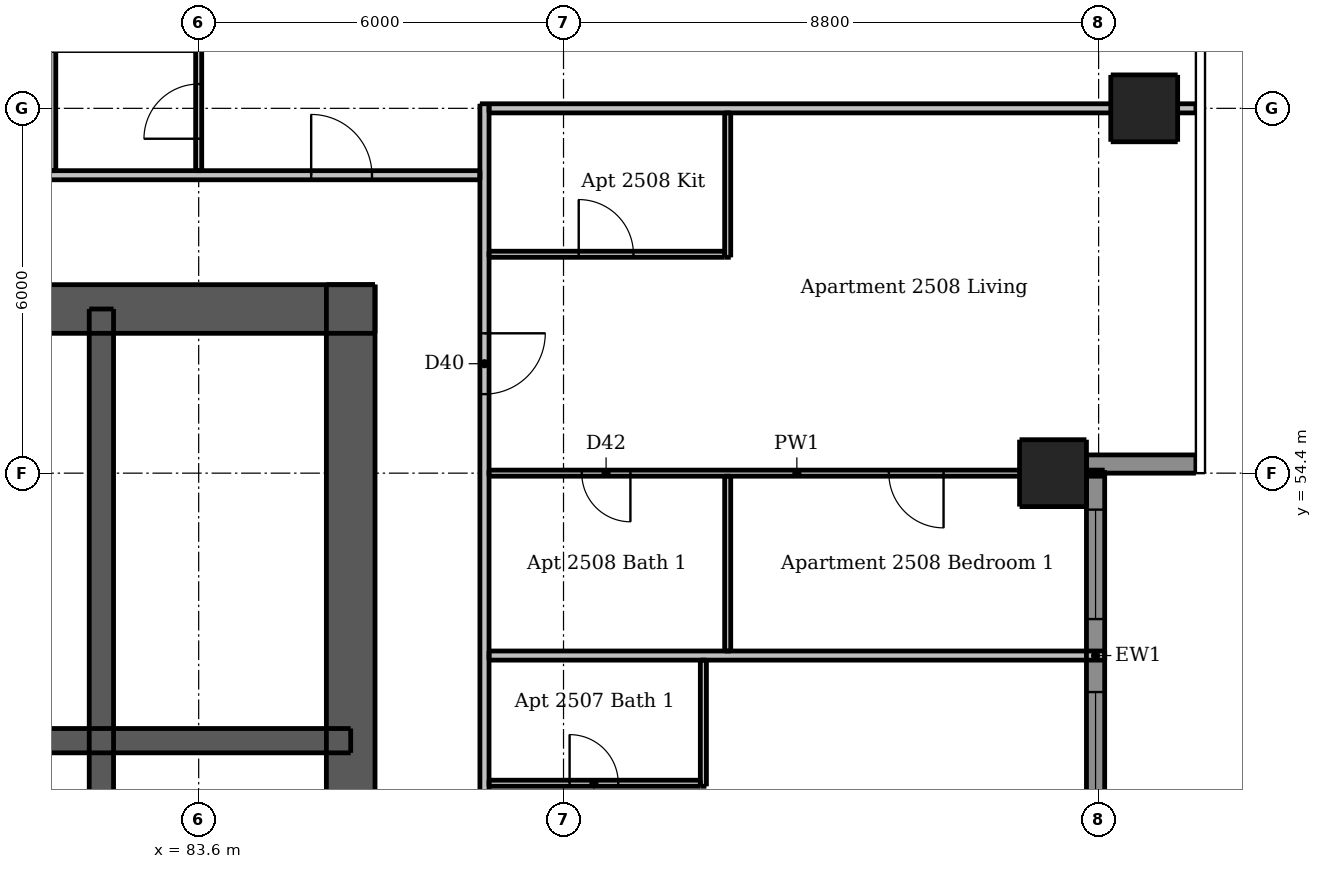
"""IFC4 building model, lengths in metres.
Left out: names, types, materials, properties, quantities, classifications, styles, units other than length and angle.
Written with IfcOpenShell. Run it as: python <this file> out.ifc"""

import sys

from ifc_helpers import new_model, si_unit, direction, frame, frame_2d, origin, origin_2d, place, context, subcontext, project, spatial, rectangle, extrude, element, fill, save


model = new_model("IFC4")
c1 = context("Model", 3, precision=1e-05, world=origin(), true_north=direction((0.0, 1.0)))
c2 = subcontext(c1, "Body", "Model", "MODEL_VIEW")
j1 = project(units=[si_unit("LENGTHUNIT", "METRE"), si_unit("PLANEANGLEUNIT", "RADIAN")], contexts=[c1])
p1 = place(None, origin())
s1 = spatial("IfcSite", under=j1, at=p1, CompositionType="ELEMENT")
p2 = place(p1, origin())
s2 = spatial("IfcBuilding", under=s1, at=p2, CompositionType="ELEMENT")
p3 = place(p2, frame((0.0, 0.0, 95.2)))
s3 = spatial("IfcBuildingStorey", under=s2, at=p3, CompositionType="ELEMENT", Elevation=95.2)
p4 = place(p3, frame((62.5, 57.1, 0.0), z_axis=(0.0, 0.0, 1.0), x_axis=(1.0, 0.0, 0.0)))
e1 = element("IfcWall", 1, at=p4, inside=s3, PredefinedType="SHEAR", context=c2, shape_type="SweptSolid", body=[
    extrude(rectangle(XDim=24.0, YDim=0.8, at=frame_2d((12.0, 0.0))), origin(), (0.0, 0.0, 1.0), 3.05),
])
p5 = place(p4, frame((20.9, 0.0, 0.0)))
e2 = element("IfcOpeningElement", 2, at=p5, cuts=e1, PredefinedType="OPENING", context=c2, shape_type="SweptSolid", body=[
    extrude(rectangle(XDim=1.1, YDim=2.1, at=frame_2d((0.55, 1.05))), frame((0.0, 0.41, 0.0), z_axis=(0.0, -1.0, 0.0), x_axis=(1.0, 0.0, 0.0)), (0.0, 0.0, 1.0), 0.82),
])
p6 = place(p4, frame((2.0, 0.0, 0.0)))
e3 = element("IfcOpeningElement", 3, at=p6, cuts=e1, PredefinedType="OPENING", context=c2, shape_type="SweptSolid", body=[
    extrude(rectangle(XDim=1.1, YDim=2.1, at=frame_2d((0.55, 1.05))), frame((0.0, 0.41, 0.0), z_axis=(0.0, -1.0, 0.0), x_axis=(1.0, 0.0, 0.0)), (0.0, 0.0, 1.0), 0.82),
])
p7 = place(p4, frame((11.55, 0.0, 0.0)))
e4 = element("IfcOpeningElement", 4, at=p7, cuts=e1, PredefinedType="OPENING", context=c2, shape_type="SweptSolid", body=[
    extrude(rectangle(XDim=0.9, YDim=2.1, at=frame_2d((0.45, 1.05))), frame((0.0, 0.41, 0.0), z_axis=(0.0, -1.0, 0.0), x_axis=(1.0, 0.0, 0.0)), (0.0, 0.0, 1.0), 0.82),
])
p8 = place(p3, frame((86.1, 33.5, 0.0), z_axis=(0.0, 0.0, 1.0), x_axis=(0.0, 1.0, 0.0)))
e5 = element("IfcWall", 5, at=p8, inside=s3, PredefinedType="SHEAR", context=c2, shape_type="SweptSolid", body=[
    extrude(rectangle(XDim=24.0, YDim=0.8, at=frame_2d((12.0, 0.0))), origin(), (0.0, 0.0, 1.0), 3.05),
])
p9 = place(p8, frame((11.2, 0.0, 0.0)))
e6 = element("IfcOpeningElement", 6, at=p9, cuts=e5, PredefinedType="OPENING", context=c2, shape_type="SweptSolid", body=[
    extrude(rectangle(XDim=1.6, YDim=2.1, at=frame_2d((0.8, 1.05))), frame((0.0, 0.41, 0.0), z_axis=(0.0, -1.0, 0.0), x_axis=(1.0, 0.0, 0.0)), (0.0, 0.0, 1.0), 0.82),
])
p10 = place(p3, frame((62.9, 50.0, 0.0), z_axis=(0.0, 0.0, 1.0), x_axis=(1.0, 0.0, 0.0)))
e7 = element("IfcWall", 7, at=p10, inside=s3, PredefinedType="SHEAR", context=c2, shape_type="SweptSolid", body=[
    extrude(rectangle(XDim=23.2, YDim=0.4, at=frame_2d((11.6, 0.0))), origin(), (0.0, 0.0, 1.0), 3.05),
])
p11 = place(p3, frame((82.0, 47.1, 0.0), z_axis=(0.0, 0.0, 1.0), x_axis=(0.0, 1.0, 0.0)))
e8 = element("IfcWall", 8, at=p11, inside=s3, PredefinedType="SHEAR", context=c2, shape_type="SweptSolid", body=[
    extrude(rectangle(XDim=10.0, YDim=0.4, at=frame_2d((5.0, 0.0))), origin(), (0.0, 0.0, 1.0), 3.05),
])
for number, where, z_axis, x_axis in (
    (9, (97.65, 54.4, 0.0), (0.0, 0.0, 1.0), (1.0, 0.0, 0.0)),
    (10, (99.15, 60.4, 0.0), (0.0, 0.0, 1.0), (1.0, 0.0, 0.0)),
):
    element("IfcColumn", number, at=place(p3, frame(where, z_axis=z_axis, x_axis=x_axis)), inside=s3, PredefinedType="COLUMN", context=c2, shape_type="SweptSolid", body=[
        extrude(rectangle(XDim=1.1, YDim=1.1, at=origin_2d()), origin(), (0.0, 0.0, 1.0), 3.05),
    ])
p12 = place(p3, frame((98.2, 54.55, 0.0), z_axis=(0.0, 0.0, 1.0), x_axis=(1.0, 0.0, 0.0)))
e11 = element("IfcWall", 11, at=p12, inside=s3, PredefinedType="SOLIDWALL", context=c2, shape_type="SweptSolid", body=[
    extrude(rectangle(XDim=1.8, YDim=0.3, at=frame_2d((0.9, 0.0))), origin(), (0.0, 0.0, 1.0), 3.05),
])
p13 = place(p3, frame((98.35, 48.4, 0.0), z_axis=(0.0, 0.0, 1.0), x_axis=(0.0, 1.0, 0.0)))
e12 = element("IfcWall", 12, at=p13, inside=s3, PredefinedType="SOLIDWALL", context=c2, shape_type="SweptSolid", body=[
    extrude(rectangle(XDim=6.0, YDim=0.3, at=frame_2d((3.0, 0.0))), origin(), (0.0, 0.0, 1.0), 3.05),
])
p14 = place(p13, frame((0.6, 0.0, 0.15)))
e13 = element("IfcOpeningElement", 13, at=p14, cuts=e12, PredefinedType="OPENING", context=c2, shape_type="SweptSolid", body=[
    extrude(rectangle(XDim=1.8, YDim=2.1, at=frame_2d((0.9, 1.05))), frame((0.0, 0.16, 0.0), z_axis=(0.0, -1.0, 0.0), x_axis=(1.0, 0.0, 0.0)), (0.0, 0.0, 1.0), 0.32),
])
p15 = place(p13, frame((3.6, 0.0, 0.15)))
e14 = element("IfcOpeningElement", 14, at=p15, cuts=e12, PredefinedType="OPENING", context=c2, shape_type="SweptSolid", body=[
    extrude(rectangle(XDim=1.8, YDim=2.1, at=frame_2d((0.9, 1.05))), frame((0.0, 0.16, 0.0), z_axis=(0.0, -1.0, 0.0), x_axis=(1.0, 0.0, 0.0)), (0.0, 0.0, 1.0), 0.32),
])
p16 = place(p3, frame((81.2, 59.375, 0.0), z_axis=(0.0, 0.0, 1.0), x_axis=(0.0, 1.0, 0.0)))
e15 = element("IfcWall", 15, at=p16, inside=s3, PredefinedType="PARTITIONING", context=c2, shape_type="SweptSolid", body=[
    extrude(rectangle(XDim=1.975, YDim=0.1, at=frame_2d((0.988, 0.0))), origin(), (0.0, 0.0, 1.0), 3.05),
])
p17 = place(p3, frame((83.6, 59.375, 0.0), z_axis=(0.0, 0.0, 1.0), x_axis=(0.0, 1.0, 0.0)))
e16 = element("IfcWall", 16, at=p17, inside=s3, PredefinedType="PARTITIONING", context=c2, shape_type="SweptSolid", body=[
    extrude(rectangle(XDim=8.625, YDim=0.1, at=frame_2d((4.312, 0.0))), origin(), (0.0, 0.0, 1.0), 2.516),
])
p18 = place(p17, frame((0.525, 0.0, 0.0)))
e17 = element("IfcOpeningElement", 17, at=p18, cuts=e16, PredefinedType="OPENING", context=c2, shape_type="SweptSolid", body=[
    extrude(rectangle(XDim=0.9, YDim=2.1, at=frame_2d((0.45, 1.05))), frame((0.0, 0.06, 0.0), z_axis=(0.0, -1.0, 0.0), x_axis=(1.0, 0.0, 0.0)), (0.0, 0.0, 1.0), 0.12),
])
p19 = place(p17, frame((4.875, 0.0, 0.0)))
e18 = element("IfcOpeningElement", 18, at=p19, cuts=e16, PredefinedType="OPENING", context=c2, shape_type="SweptSolid", body=[
    extrude(rectangle(XDim=0.9, YDim=2.1, at=frame_2d((0.45, 1.05))), frame((0.0, 0.06, 0.0), z_axis=(0.0, -1.0, 0.0), x_axis=(1.0, 0.0, 0.0)), (0.0, 0.0, 1.0), 0.12),
])
p20 = place(p3, frame((91.9, 49.25, 0.0), z_axis=(0.0, 0.0, 1.0), x_axis=(0.0, 1.0, 0.0)))
e19 = element("IfcWall", 19, at=p20, inside=s3, PredefinedType="PARTITIONING", context=c2, shape_type="SweptSolid", body=[
    extrude(rectangle(XDim=2.075, YDim=0.1, at=frame_2d((1.038, 0.0))), origin(), (0.0, 0.0, 1.0), 3.05),
])
p21 = place(p3, frame((92.3, 51.475, 0.0), z_axis=(0.0, 0.0, 1.0), x_axis=(0.0, 1.0, 0.0)))
e20 = element("IfcWall", 20, at=p21, inside=s3, PredefinedType="PARTITIONING", context=c2, shape_type="SweptSolid", body=[
    extrude(rectangle(XDim=2.875, YDim=0.1, at=frame_2d((1.438, 0.0))), origin(), (0.0, 0.0, 1.0), 3.05),
])
p22 = place(p3, frame((92.3, 57.95, 0.0), z_axis=(0.0, 0.0, 1.0), x_axis=(0.0, 1.0, 0.0)))
e21 = element("IfcWall", 21, at=p22, inside=s3, PredefinedType="PARTITIONING", context=c2, shape_type="SweptSolid", body=[
    extrude(rectangle(XDim=2.375, YDim=0.1, at=frame_2d((1.188, 0.0))), origin(), (0.0, 0.0, 1.0), 3.05),
])
p23 = place(p3, frame((88.375, 58.0, 0.0), z_axis=(0.0, 0.0, 1.0), x_axis=(1.0, 0.0, 0.0)))
e22 = element("IfcWall", 22, at=p23, inside=s3, PredefinedType="PARTITIONING", context=c2, shape_type="SweptSolid", body=[
    extrude(rectangle(XDim=3.875, YDim=0.1, at=frame_2d((1.938, 0.0))), origin(), (0.0, 0.0, 1.0), 3.05),
])
p24 = place(p23, frame((1.475, 0.0, 0.0)))
e23 = element("IfcOpeningElement", 23, at=p24, cuts=e22, PredefinedType="OPENING", context=c2, shape_type="SweptSolid", body=[
    extrude(rectangle(XDim=0.9, YDim=2.1, at=frame_2d((0.45, 1.05))), frame((0.0, 0.06, 0.0), z_axis=(0.0, -1.0, 0.0), x_axis=(1.0, 0.0, 0.0)), (0.0, 0.0, 1.0), 0.12),
])
p25 = place(p3, frame((98.5, 54.4, 0.0), z_axis=(0.0, 0.0, 1.0), x_axis=(-1.0, 0.0, 0.0)))
e24 = element("IfcWall", 24, at=p25, inside=s3, PredefinedType="PARTITIONING", context=c2, shape_type="SweptSolid", body=[
    extrude(rectangle(XDim=10.125, YDim=0.1, at=frame_2d((5.062, 0.0))), origin(), (0.0, 0.0, 1.0), 2.516),
])
p26 = place(p25, frame((2.65, 0.0, 0.0)))
e25 = element("IfcOpeningElement", 25, at=p26, cuts=e24, PredefinedType="OPENING", context=c2, shape_type="SweptSolid", body=[
    extrude(rectangle(XDim=0.9, YDim=2.1, at=frame_2d((0.45, 1.05))), frame((0.0, 0.06, 0.0), z_axis=(0.0, -1.0, 0.0), x_axis=(1.0, 0.0, 0.0)), (0.0, 0.0, 1.0), 0.12),
])
p27 = place(p25, frame((7.8, 0.0, 0.0)))
e26 = element("IfcOpeningElement", 26, at=p27, cuts=e24, PredefinedType="OPENING", context=c2, shape_type="SweptSolid", body=[
    extrude(rectangle(XDim=0.8, YDim=2.1, at=frame_2d((0.4, 1.05))), frame((0.0, 0.06, 0.0), z_axis=(0.0, -1.0, 0.0), x_axis=(1.0, 0.0, 0.0)), (0.0, 0.0, 1.0), 0.12),
])
p28 = place(p3, frame((88.375, 49.3, 0.0), z_axis=(0.0, 0.0, 1.0), x_axis=(1.0, 0.0, 0.0)))
e27 = element("IfcWall", 27, at=p28, inside=s3, PredefinedType="PARTITIONING", context=c2, shape_type="SweptSolid", body=[
    extrude(rectangle(XDim=3.475, YDim=0.1, at=frame_2d((1.738, 0.0))), origin(), (0.0, 0.0, 1.0), 3.05),
])
p29 = place(p28, frame((1.325, 0.0, 0.0)))
e28 = element("IfcOpeningElement", 28, at=p29, cuts=e27, PredefinedType="OPENING", context=c2, shape_type="SweptSolid", body=[
    extrude(rectangle(XDim=0.8, YDim=2.1, at=frame_2d((0.4, 1.05))), frame((0.0, 0.06, 0.0), z_axis=(0.0, -1.0, 0.0), x_axis=(1.0, 0.0, 0.0)), (0.0, 0.0, 1.0), 0.12),
])
p30 = place(p3, frame((88.3, 60.475, 0.0), z_axis=(0.0, 0.0, 1.0), x_axis=(0.0, -1.0, 0.0)))
e29 = element("IfcWall", 29, at=p30, inside=s3, PredefinedType="PARTITIONING", context=c2, shape_type="SweptSolid", body=[
    extrude(rectangle(XDim=28.7, YDim=0.15, at=frame_2d((14.35, 0.0))), origin(), (0.0, 0.0, 1.0), 3.05),
])
p31 = place(p30, frame((27.425, 0.0, 0.0)))
e30 = element("IfcOpeningElement", 30, at=p31, cuts=e29, PredefinedType="OPENING", context=c2, shape_type="SweptSolid", body=[
    extrude(rectangle(XDim=1.0, YDim=2.1, at=frame_2d((0.5, 1.05))), frame((0.0, 0.085, 0.0), z_axis=(0.0, -1.0, 0.0), x_axis=(1.0, 0.0, 0.0)), (0.0, 0.0, 1.0), 0.17),
])
p32 = place(p30, frame((17.575, 0.0, 0.0)))
e31 = element("IfcOpeningElement", 31, at=p32, cuts=e29, PredefinedType="OPENING", context=c2, shape_type="SweptSolid", body=[
    extrude(rectangle(XDim=1.0, YDim=2.1, at=frame_2d((0.5, 1.05))), frame((0.0, 0.085, 0.0), z_axis=(0.0, -1.0, 0.0), x_axis=(1.0, 0.0, 0.0)), (0.0, 0.0, 1.0), 0.17),
])
p33 = place(p30, frame((11.575, 0.0, 0.0)))
e32 = element("IfcOpeningElement", 32, at=p33, cuts=e29, PredefinedType="OPENING", context=c2, shape_type="SweptSolid", body=[
    extrude(rectangle(XDim=1.0, YDim=2.1, at=frame_2d((0.5, 1.05))), frame((0.0, 0.085, 0.0), z_axis=(0.0, -1.0, 0.0), x_axis=(1.0, 0.0, 0.0)), (0.0, 0.0, 1.0), 0.17),
])
p34 = place(p30, frame((3.775, 0.0, 0.0)))
e33 = element("IfcOpeningElement", 33, at=p34, cuts=e29, PredefinedType="OPENING", context=c2, shape_type="SweptSolid", body=[
    extrude(rectangle(XDim=1.0, YDim=2.1, at=frame_2d((0.5, 1.05))), frame((0.0, 0.085, 0.0), z_axis=(0.0, -1.0, 0.0), x_axis=(1.0, 0.0, 0.0)), (0.0, 0.0, 1.0), 0.17),
])
p35 = place(p3, frame((88.375, 60.4, 0.0), z_axis=(0.0, 0.0, 1.0), x_axis=(1.0, 0.0, 0.0)))
e34 = element("IfcWall", 34, at=p35, inside=s3, PredefinedType="PARTITIONING", context=c2, shape_type="SweptSolid", body=[
    extrude(rectangle(XDim=11.625, YDim=0.15, at=frame_2d((5.812, 0.0))), origin(), (0.0, 0.0, 1.0), 2.516),
])
p36 = place(p3, frame((59.675, 59.3, 0.0), z_axis=(0.0, 0.0, 1.0), x_axis=(1.0, 0.0, 0.0)))
e35 = element("IfcWall", 35, at=p36, inside=s3, PredefinedType="PARTITIONING", context=c2, shape_type="SweptSolid", body=[
    extrude(rectangle(XDim=28.55, YDim=0.15, at=frame_2d((14.275, 0.0))), origin(), (0.0, 0.0, 1.0), 3.05),
])
p37 = place(p36, frame((2.425, 0.0, 0.0)))
e36 = element("IfcOpeningElement", 36, at=p37, cuts=e35, PredefinedType="OPENING", context=c2, shape_type="SweptSolid", body=[
    extrude(rectangle(XDim=1.0, YDim=2.1, at=frame_2d((0.5, 1.05))), frame((0.0, 0.085, 0.0), z_axis=(0.0, -1.0, 0.0), x_axis=(1.0, 0.0, 0.0)), (0.0, 0.0, 1.0), 0.17),
])
p38 = place(p36, frame((8.425, 0.0, 0.0)))
e37 = element("IfcOpeningElement", 37, at=p38, cuts=e35, PredefinedType="OPENING", context=c2, shape_type="SweptSolid", body=[
    extrude(rectangle(XDim=1.0, YDim=2.1, at=frame_2d((0.5, 1.05))), frame((0.0, 0.085, 0.0), z_axis=(0.0, -1.0, 0.0), x_axis=(1.0, 0.0, 0.0)), (0.0, 0.0, 1.0), 0.17),
])
p39 = place(p36, frame((14.425, 0.0, 0.0)))
e38 = element("IfcOpeningElement", 38, at=p39, cuts=e35, PredefinedType="OPENING", context=c2, shape_type="SweptSolid", body=[
    extrude(rectangle(XDim=1.0, YDim=2.1, at=frame_2d((0.5, 1.05))), frame((0.0, 0.085, 0.0), z_axis=(0.0, -1.0, 0.0), x_axis=(1.0, 0.0, 0.0)), (0.0, 0.0, 1.0), 0.17),
])
p40 = place(p36, frame((25.775, 0.0, 0.0)))
e39 = element("IfcOpeningElement", 39, at=p40, cuts=e35, PredefinedType="OPENING", context=c2, shape_type="SweptSolid", body=[
    extrude(rectangle(XDim=1.0, YDim=2.1, at=frame_2d((0.5, 1.05))), frame((0.0, 0.085, 0.0), z_axis=(0.0, -1.0, 0.0), x_axis=(1.0, 0.0, 0.0)), (0.0, 0.0, 1.0), 0.17),
])
p41 = place(p3, frame((88.375, 51.4, 0.0), z_axis=(0.0, 0.0, 1.0), x_axis=(1.0, 0.0, 0.0)))
e40 = element("IfcWall", 40, at=p41, inside=s3, PredefinedType="PARTITIONING", context=c2, shape_type="SweptSolid", body=[
    extrude(rectangle(XDim=10.125, YDim=0.15, at=frame_2d((5.062, 0.0))), origin(), (0.0, 0.0, 1.0), 3.05),
])
p42 = place(p14, origin())
e41 = element("IfcWindow", 41, at=p42, inside=s3, PartitioningType="DOUBLE_PANEL_VERTICAL", PredefinedType="WINDOW", context=c2, shape_type="SweptSolid", body=[
    extrude(rectangle(XDim=1.8, YDim=2.1, at=frame_2d((0.9, 1.05))), frame((0.0, 0.03, 0.0), z_axis=(0.0, -1.0, 0.0), x_axis=(1.0, 0.0, 0.0)), (0.0, 0.0, 1.0), 0.06),
])
fill(e13, e41)
p43 = place(p15, origin())
e42 = element("IfcWindow", 42, at=p43, inside=s3, PartitioningType="DOUBLE_PANEL_VERTICAL", PredefinedType="WINDOW", context=c2, shape_type="SweptSolid", body=[
    extrude(rectangle(XDim=1.8, YDim=2.1, at=frame_2d((0.9, 1.05))), frame((0.0, 0.03, 0.0), z_axis=(0.0, -1.0, 0.0), x_axis=(1.0, 0.0, 0.0)), (0.0, 0.0, 1.0), 0.06),
])
fill(e14, e42)
p44 = place(p5, origin())
e43 = element("IfcDoor", 43, at=p44, inside=s3, OperationType="SINGLE_SWING_RIGHT", PredefinedType="DOOR", context=c2, shape_type="SweptSolid", body=[
    extrude(rectangle(XDim=1.1, YDim=2.1, at=frame_2d((0.55, 1.05))), frame((0.0, -0.337, 0.0), z_axis=(0.0, -1.0, 0.0), x_axis=(1.0, 0.0, 0.0)), (0.0, 0.0, 1.0), 0.05),
])
fill(e2, e43)
p45 = place(p29, origin())
e44 = element("IfcDoor", 44, at=p45, inside=s3, OperationType="SINGLE_SWING_LEFT", PredefinedType="DOOR", context=c2, shape_type="SweptSolid", body=[
    extrude(rectangle(XDim=0.8, YDim=2.1, at=frame_2d((0.4, 1.05))), frame((0.0, 0.025, 0.0), z_axis=(0.0, -1.0, 0.0), x_axis=(1.0, 0.0, 0.0)), (0.0, 0.0, 1.0), 0.05),
])
fill(e28, e44)
p46 = place(p34, origin())
e45 = element("IfcDoor", 45, at=p46, inside=s3, OperationType="SINGLE_SWING_LEFT", PredefinedType="DOOR", context=c2, shape_type="SweptSolid", body=[
    extrude(rectangle(XDim=1.0, YDim=2.1, at=frame_2d((0.5, 1.05))), frame((0.0, 0.025, 0.0), z_axis=(0.0, -1.0, 0.0), x_axis=(1.0, 0.0, 0.0)), (0.0, 0.0, 1.0), 0.05),
])
fill(e33, e45)
p47 = place(p24, origin())
e46 = element("IfcDoor", 46, at=p47, inside=s3, OperationType="SINGLE_SWING_LEFT", PredefinedType="DOOR", context=c2, shape_type="SweptSolid", body=[
    extrude(rectangle(XDim=0.9, YDim=2.1, at=frame_2d((0.45, 1.05))), frame((0.0, 0.025, 0.0), z_axis=(0.0, -1.0, 0.0), x_axis=(1.0, 0.0, 0.0)), (0.0, 0.0, 1.0), 0.05),
])
fill(e23, e46)
p48 = place(p26, origin())
e47 = element("IfcDoor", 47, at=p48, inside=s3, OperationType="SINGLE_SWING_LEFT", PredefinedType="DOOR", context=c2, shape_type="SweptSolid", body=[
    extrude(rectangle(XDim=0.9, YDim=2.1, at=frame_2d((0.45, 1.05))), frame((0.0, 0.025, 0.0), z_axis=(0.0, -1.0, 0.0), x_axis=(1.0, 0.0, 0.0)), (0.0, 0.0, 1.0), 0.05),
])
fill(e25, e47)
p49 = place(p27, origin())
e48 = element("IfcDoor", 48, at=p49, inside=s3, OperationType="SINGLE_SWING_LEFT", PredefinedType="DOOR", context=c2, shape_type="SweptSolid", body=[
    extrude(rectangle(XDim=0.8, YDim=2.1, at=frame_2d((0.4, 1.05))), frame((0.0, 0.025, 0.0), z_axis=(0.0, -1.0, 0.0), x_axis=(1.0, 0.0, 0.0)), (0.0, 0.0, 1.0), 0.05),
])
fill(e26, e48)
p50 = place(p40, origin())
e49 = element("IfcDoor", 49, at=p50, inside=s3, OperationType="SINGLE_SWING_LEFT", PredefinedType="DOOR", context=c2, shape_type="SweptSolid", body=[
    extrude(rectangle(XDim=1.0, YDim=2.1, at=frame_2d((0.5, 1.05))), frame((0.0, 0.025, 0.0), z_axis=(0.0, -1.0, 0.0), x_axis=(1.0, 0.0, 0.0)), (0.0, 0.0, 1.0), 0.05),
])
fill(e39, e49)
p51 = place(p18, origin())
e50 = element("IfcDoor", 50, at=p51, inside=s3, OperationType="SINGLE_SWING_LEFT", PredefinedType="DOOR", context=c2, shape_type="SweptSolid", body=[
    extrude(rectangle(XDim=0.9, YDim=2.1, at=frame_2d((0.45, 1.05))), frame((0.0, 0.025, 0.0), z_axis=(0.0, -1.0, 0.0), x_axis=(1.0, 0.0, 0.0)), (0.0, 0.0, 1.0), 0.05),
])
fill(e17, e50)
save(model, sys.argv[1])
